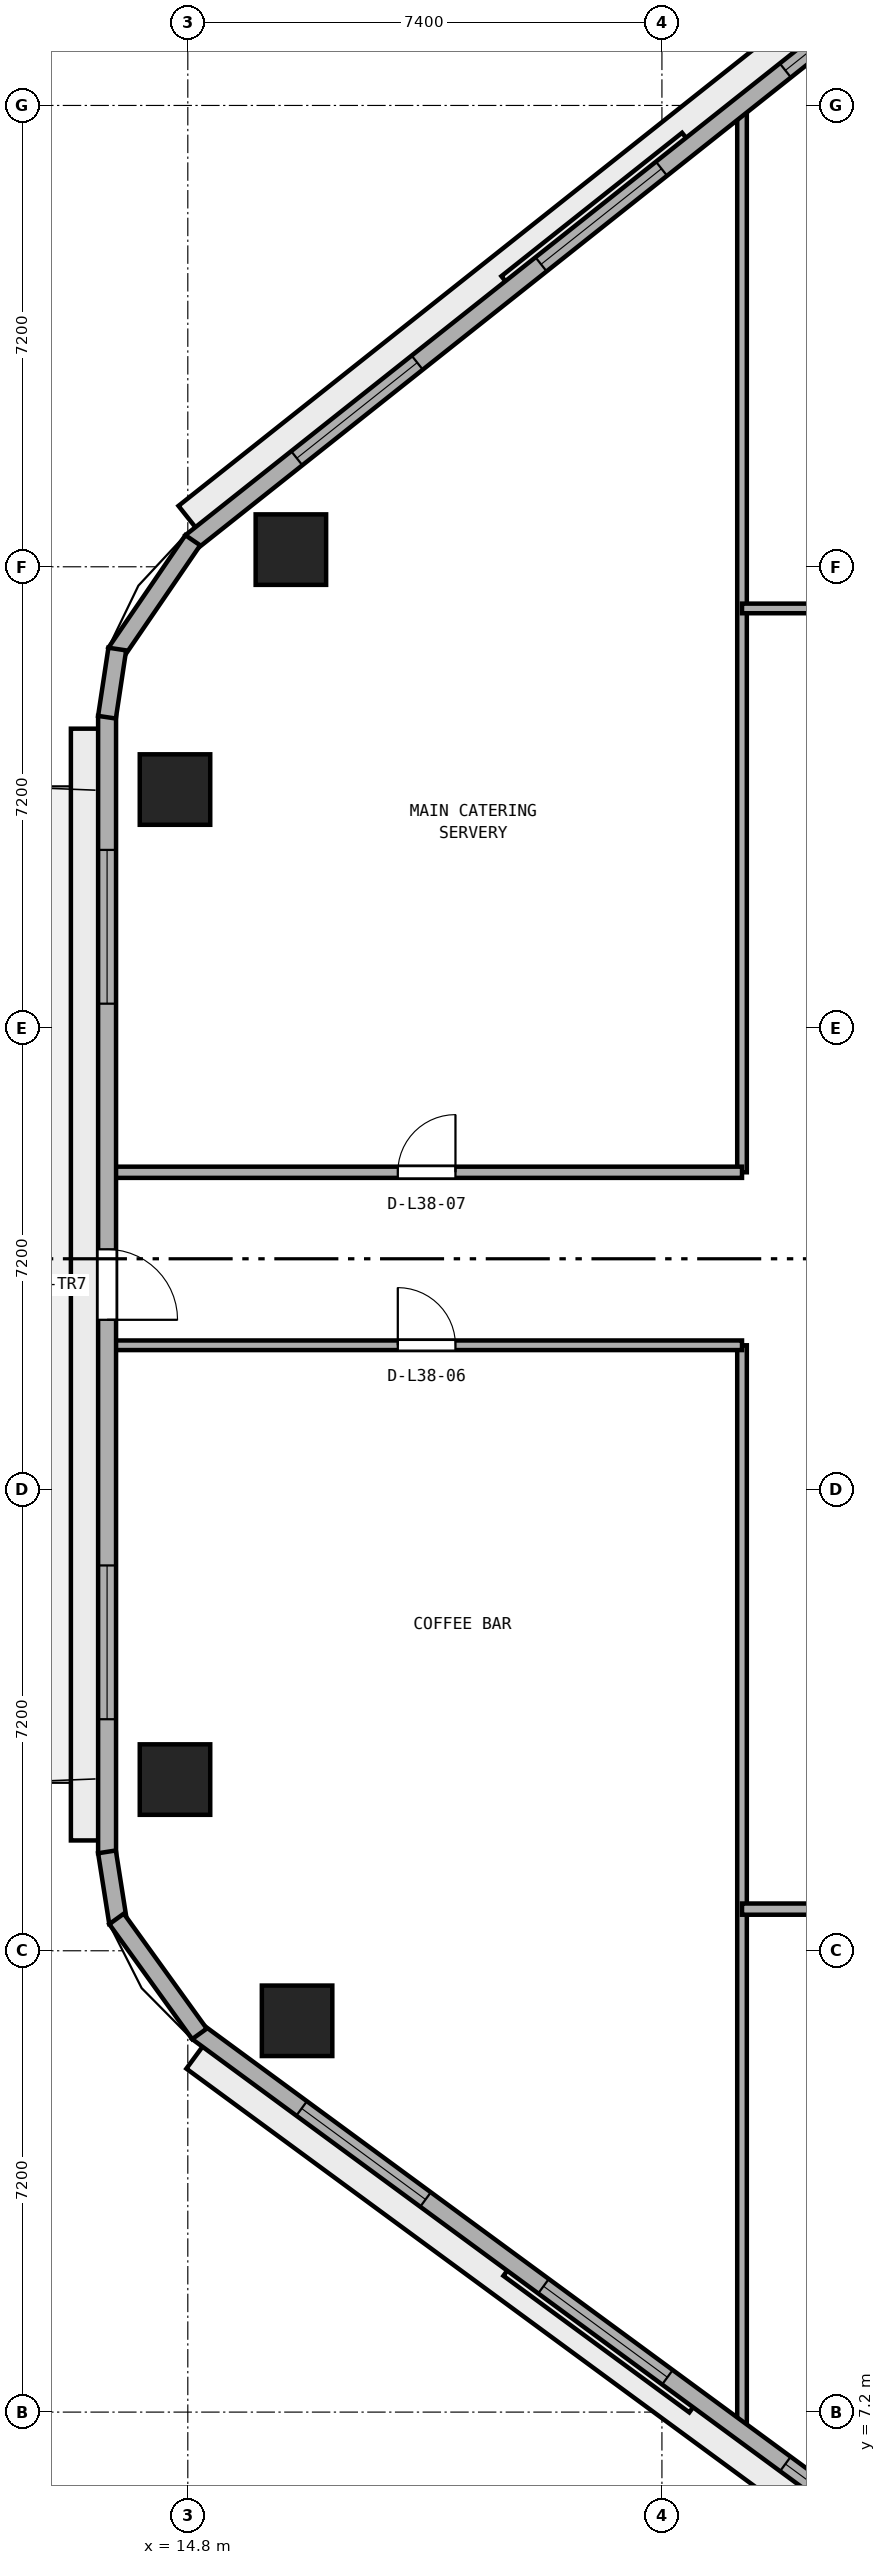
"""IFC4 building model, lengths in metres.
Left out: names, types, materials, properties, quantities, classifications, styles, units other than length and angle.
Written with IfcOpenShell. Run it as: python <this file> out.ifc"""

import sys

from ifc_helpers import new_model, si_unit, direction, frame, frame_2d, origin, origin_2d, place, context, subcontext, project, spatial, rectangle, extrude, element, fill, save


model = new_model("IFC4")
c1 = context("Model", 3, precision=1e-05, world=origin(), true_north=direction((0.0, 1.0)))
c2 = subcontext(c1, "Body", "Model", "MODEL_VIEW")
j1 = project(units=[si_unit("LENGTHUNIT", "METRE"), si_unit("PLANEANGLEUNIT", "RADIAN")], contexts=[c1])
p1 = place(None, origin())
s1 = spatial("IfcSite", under=j1, at=p1, CompositionType="ELEMENT")
p2 = place(p1, origin())
s2 = spatial("IfcBuilding", under=s1, at=p2, CompositionType="ELEMENT")
p3 = place(p2, frame((0.0, 0.0, 151.6)))
s3 = spatial("IfcBuildingStorey", under=s2, at=p3, CompositionType="ELEMENT", Elevation=151.6)
for number, where, z_axis, x_axis in (
    (1, (16.409, 36.268, 0.0), (0.0, 0.0, 1.0), (1.0, 0.0, 0.0)),
    (2, (14.6, 32.523, 0.0), (0.0, 0.0, 1.0), (1.0, 0.0, 0.0)),
    (3, (14.6, 17.072, 0.0), (0.0, 0.0, 1.0), (1.0, 0.0, 0.0)),
    (4, (16.505, 13.307, 0.0), (0.0, 0.0, 1.0), (1.0, 0.0, 0.0)),
):
    element("IfcColumn", number, at=place(p3, frame(where, z_axis=z_axis, x_axis=x_axis)), inside=s3, PredefinedType="COLUMN", context=c2, shape_type="SweptSolid", body=[
        extrude(rectangle(XDim=1.1, YDim=1.1, at=origin_2d()), origin(), (0.0, 0.0, 1.0), 3.8),
    ])
p4 = place(p3, frame((23.45, 6.854, 0.0), z_axis=(0.0, 0.0, 1.0), x_axis=(0.0, 1.0, 0.0)))
e5 = element("IfcWall", 5, at=p4, inside=s3, PredefinedType="PARTITIONING", context=c2, shape_type="SweptSolid", body=[
    extrude(rectangle(XDim=16.996, YDim=0.15, at=frame_2d((8.498, 0.0))), origin(), (0.0, 0.0, 1.0), 3.54),
])
p5 = place(p3, frame((23.45, 26.55, 0.0), z_axis=(0.0, 0.0, 1.0), x_axis=(0.0, 1.0, 0.0)))
e6 = element("IfcWall", 6, at=p5, inside=s3, PredefinedType="PARTITIONING", context=c2, shape_type="SweptSolid", body=[
    extrude(rectangle(XDim=16.698, YDim=0.15, at=frame_2d((8.349, 0.0))), origin(), (0.0, 0.0, 1.0), 3.54),
])
p6 = place(p3, frame((23.45, 15.05, 0.0), z_axis=(0.0, 0.0, 1.0), x_axis=(1.0, 0.0, 0.0)))
e7 = element("IfcWall", 7, at=p6, inside=s3, PredefinedType="PARTITIONING", context=c2, shape_type="SweptSolid", body=[
    extrude(rectangle(XDim=27.1, YDim=0.175, at=frame_2d((13.55, 0.0))), origin(), (0.0, 0.0, 1.0), 3.54),
])
p7 = place(p6, frame((3.895, 0.0, 0.0)))
e8 = element("IfcOpeningElement", 8, at=p7, cuts=e7, PredefinedType="OPENING", context=c2, shape_type="SweptSolid", body=[
    extrude(rectangle(XDim=0.9, YDim=2.1, at=frame_2d((0.45, 1.05))), frame((0.0, 0.097, 0.0), z_axis=(0.0, -1.0, 0.0), x_axis=(1.0, 0.0, 0.0)), (0.0, 0.0, 1.0), 0.195),
])
p8 = place(p6, frame((13.75, 0.0, 0.0)))
e9 = element("IfcOpeningElement", 9, at=p8, cuts=e7, PredefinedType="OPENING", context=c2, shape_type="SweptSolid", body=[
    extrude(rectangle(XDim=0.9, YDim=2.1, at=frame_2d((0.45, 1.05))), frame((0.0, 0.097, 0.0), z_axis=(0.0, -1.0, 0.0), x_axis=(1.0, 0.0, 0.0)), (0.0, 0.0, 1.0), 0.195),
])
p9 = place(p6, frame((22.955, 0.0, 0.0)))
e10 = element("IfcOpeningElement", 10, at=p9, cuts=e7, PredefinedType="OPENING", context=c2, shape_type="SweptSolid", body=[
    extrude(rectangle(XDim=0.9, YDim=2.1, at=frame_2d((0.45, 1.05))), frame((0.0, 0.097, 0.0), z_axis=(0.0, -1.0, 0.0), x_axis=(1.0, 0.0, 0.0)), (0.0, 0.0, 1.0), 0.195),
])
p10 = place(p3, frame((13.605, 23.85, 0.0), z_axis=(0.0, 0.0, 1.0), x_axis=(1.0, 0.0, 0.0)))
e11 = element("IfcWall", 11, at=p10, inside=s3, PredefinedType="PARTITIONING", context=c2, shape_type="SweptSolid", body=[
    extrude(rectangle(XDim=9.845, YDim=0.15, at=frame_2d((4.922, 0.0))), origin(), (0.0, 0.0, 1.0), 3.54),
])
p11 = place(p10, frame((4.472, 0.0, 0.0)))
e12 = element("IfcOpeningElement", 12, at=p11, cuts=e11, PredefinedType="OPENING", context=c2, shape_type="SweptSolid", body=[
    extrude(rectangle(XDim=0.9, YDim=2.1, at=frame_2d((0.45, 1.05))), frame((0.0, 0.085, 0.0), z_axis=(0.0, -1.0, 0.0), x_axis=(1.0, 0.0, 0.0)), (0.0, 0.0, 1.0), 0.17),
])
p12 = place(p3, frame((13.605, 26.55, 0.0), z_axis=(0.0, 0.0, 1.0), x_axis=(1.0, 0.0, 0.0)))
e13 = element("IfcWall", 13, at=p12, inside=s3, PredefinedType="PARTITIONING", context=c2, shape_type="SweptSolid", body=[
    extrude(rectangle(XDim=9.845, YDim=0.175, at=frame_2d((4.922, 0.0))), origin(), (0.0, 0.0, 1.0), 3.54),
])
p13 = place(p12, frame((4.472, 0.0, 0.0)))
e14 = element("IfcOpeningElement", 14, at=p13, cuts=e13, PredefinedType="OPENING", context=c2, shape_type="SweptSolid", body=[
    extrude(rectangle(XDim=0.9, YDim=2.1, at=frame_2d((0.45, 1.05))), frame((0.0, 0.097, 0.0), z_axis=(0.0, -1.0, 0.0), x_axis=(1.0, 0.0, 0.0)), (0.0, 0.0, 1.0), 0.195),
])
p14 = place(p3, frame((23.45, 35.35, 0.0), z_axis=(0.0, 0.0, 1.0), x_axis=(1.0, 0.0, 0.0)))
e15 = element("IfcWall", 15, at=p14, inside=s3, PredefinedType="PARTITIONING", context=c2, shape_type="SweptSolid", body=[
    extrude(rectangle(XDim=10.95, YDim=0.15, at=frame_2d((5.475, 0.0))), origin(), (0.0, 0.0, 1.0), 3.54),
])
p15 = place(p14, frame((3.295, 0.0, 0.0)))
e16 = element("IfcOpeningElement", 16, at=p15, cuts=e15, PredefinedType="OPENING", context=c2, shape_type="SweptSolid", body=[
    extrude(rectangle(XDim=1.0, YDim=2.12, at=frame_2d((0.5, 1.06))), frame((0.0, 0.085, 0.0), z_axis=(0.0, -1.0, 0.0), x_axis=(1.0, 0.0, 0.0)), (0.0, 0.0, 1.0), 0.17),
])
p16 = place(p14, frame((8.53, 0.0, 0.0)))
e17 = element("IfcOpeningElement", 17, at=p16, cuts=e15, PredefinedType="OPENING", context=c2, shape_type="SweptSolid", body=[
    extrude(rectangle(XDim=1.0, YDim=2.12, at=frame_2d((0.5, 1.06))), frame((0.0, 0.085, 0.0), z_axis=(0.0, -1.0, 0.0), x_axis=(1.0, 0.0, 0.0)), (0.0, 0.0, 1.0), 0.17),
])
p17 = place(p3, frame((27.658, 46.55, 0.0), z_axis=(0.0, 0.0, 1.0), x_axis=(-0.783266285861, -0.621686356158, 0.0)))
e18 = element("IfcWall", 18, at=p17, inside=s3, PredefinedType="STANDARD", context=c2, shape_type="SweptSolid", body=[
    extrude(rectangle(XDim=16.353, YDim=0.28, at=frame_2d((8.177, 0.0))), origin(), (0.0, 0.0, 1.0), 3.54),
])
p18 = place(p17, frame((2.109, 0.0, 0.9)))
e19 = element("IfcOpeningElement", 19, at=p18, cuts=e18, PredefinedType="OPENING", context=c2, shape_type="SweptSolid", body=[
    extrude(rectangle(XDim=2.4, YDim=1.75, at=frame_2d((1.2, 0.875))), frame((0.0, 0.15, 0.0), z_axis=(0.0, -1.0, 0.0), x_axis=(1.0, 0.0, 0.0)), (0.0, 0.0, 1.0), 0.3),
])
p19 = place(p17, frame((6.977, 0.0, 0.9)))
e20 = element("IfcOpeningElement", 20, at=p19, cuts=e18, PredefinedType="OPENING", context=c2, shape_type="SweptSolid", body=[
    extrude(rectangle(XDim=2.4, YDim=1.75, at=frame_2d((1.2, 0.875))), frame((0.0, 0.15, 0.0), z_axis=(0.0, -1.0, 0.0), x_axis=(1.0, 0.0, 0.0)), (0.0, 0.0, 1.0), 0.3),
])
p20 = place(p17, frame((11.844, 0.0, 0.9)))
e21 = element("IfcOpeningElement", 21, at=p20, cuts=e18, PredefinedType="OPENING", context=c2, shape_type="SweptSolid", body=[
    extrude(rectangle(XDim=2.4, YDim=1.75, at=frame_2d((1.2, 0.875))), frame((0.0, 0.15, 0.0), z_axis=(0.0, -1.0, 0.0), x_axis=(1.0, 0.0, 0.0)), (0.0, 0.0, 1.0), 0.3),
])
p21 = place(p3, frame((13.54, 33.673, 0.0), z_axis=(0.0, 0.0, 1.0), x_axis=(0.0, -1.0, 0.0)))
e22 = element("IfcWall", 22, at=p21, inside=s3, PredefinedType="STANDARD", context=c2, shape_type="SweptSolid", body=[
    extrude(rectangle(XDim=17.751, YDim=0.28, at=frame_2d((8.875, 0.0))), origin(), (0.0, 0.0, 1.0), 3.54),
])
p22 = place(p21, frame((8.326, 0.0, 0.0)))
e23 = element("IfcOpeningElement", 23, at=p22, cuts=e22, PredefinedType="OPENING", context=c2, shape_type="SweptSolid", body=[
    extrude(rectangle(XDim=1.1, YDim=2.2, at=frame_2d((0.55, 1.1))), frame((0.0, 0.15, 0.0), z_axis=(0.0, -1.0, 0.0), x_axis=(1.0, 0.0, 0.0)), (0.0, 0.0, 1.0), 0.3),
])
p23 = place(p21, frame((2.092, 0.0, 0.9)))
e24 = element("IfcOpeningElement", 24, at=p23, cuts=e22, PredefinedType="OPENING", context=c2, shape_type="SweptSolid", body=[
    extrude(rectangle(XDim=2.4, YDim=1.75, at=frame_2d((1.2, 0.875))), frame((0.0, 0.15, 0.0), z_axis=(0.0, -1.0, 0.0), x_axis=(1.0, 0.0, 0.0)), (0.0, 0.0, 1.0), 0.3),
])
p24 = place(p21, frame((13.26, 0.0, 0.9)))
e25 = element("IfcOpeningElement", 25, at=p24, cuts=e22, PredefinedType="OPENING", context=c2, shape_type="SweptSolid", body=[
    extrude(rectangle(XDim=2.4, YDim=1.75, at=frame_2d((1.2, 0.875))), frame((0.0, 0.15, 0.0), z_axis=(0.0, -1.0, 0.0), x_axis=(1.0, 0.0, 0.0)), (0.0, 0.0, 1.0), 0.3),
])
p25 = place(p3, frame((14.951, 13.134, 0.0), z_axis=(0.0, 0.0, 1.0), x_axis=(0.805804940328, -0.592181051827, 0.0)))
e26 = element("IfcWall", 26, at=p25, inside=s3, PredefinedType="STANDARD", context=c2, shape_type="SweptSolid", body=[
    extrude(rectangle(XDim=15.804, YDim=0.28, at=frame_2d((7.902, 0.0))), origin(), (0.0, 0.0, 1.0), 3.54),
])
p26 = place(p25, frame((2.017, 0.0, 0.9)))
e27 = element("IfcOpeningElement", 27, at=p26, cuts=e26, PredefinedType="OPENING", context=c2, shape_type="SweptSolid", body=[
    extrude(rectangle(XDim=2.4, YDim=1.75, at=frame_2d((1.2, 0.875))), frame((0.0, 0.15, 0.0), z_axis=(0.0, -1.0, 0.0), x_axis=(1.0, 0.0, 0.0)), (0.0, 0.0, 1.0), 0.3),
])
p27 = place(p25, frame((6.702, 0.0, 0.9)))
e28 = element("IfcOpeningElement", 28, at=p27, cuts=e26, PredefinedType="OPENING", context=c2, shape_type="SweptSolid", body=[
    extrude(rectangle(XDim=2.4, YDim=1.75, at=frame_2d((1.2, 0.875))), frame((0.0, 0.15, 0.0), z_axis=(0.0, -1.0, 0.0), x_axis=(1.0, 0.0, 0.0)), (0.0, 0.0, 1.0), 0.3),
])
p28 = place(p25, frame((11.387, 0.0, 0.9)))
e29 = element("IfcOpeningElement", 29, at=p28, cuts=e26, PredefinedType="OPENING", context=c2, shape_type="SweptSolid", body=[
    extrude(rectangle(XDim=2.4, YDim=1.75, at=frame_2d((1.2, 0.875))), frame((0.0, 0.15, 0.0), z_axis=(0.0, -1.0, 0.0), x_axis=(1.0, 0.0, 0.0)), (0.0, 0.0, 1.0), 0.3),
])
p29 = place(p3, frame((14.878, 36.414, 0.0), z_axis=(0.0, 0.0, 1.0), x_axis=(-0.564564614133, -0.825388875906, 0.0)))
e30 = element("IfcWall", 30, at=p29, inside=s3, PredefinedType="STANDARD", context=c2, shape_type="SweptSolid", body=[
    extrude(rectangle(XDim=2.128, YDim=0.28, at=frame_2d((1.064, 0.0))), origin(), (0.0, 0.0, 1.0), 3.54),
])
p30 = place(p3, frame((13.699, 34.716, 0.0), z_axis=(0.0, 0.0, 1.0), x_axis=(-0.149549920187, -0.988754176412, 0.0)))
e31 = element("IfcWall", 31, at=p30, inside=s3, PredefinedType="STANDARD", context=c2, shape_type="SweptSolid", body=[
    extrude(rectangle(XDim=1.076, YDim=0.28, at=frame_2d((0.538, 0.0))), origin(), (0.0, 0.0, 1.0), 3.54),
])
p31 = place(p3, frame((13.538, 15.944, 0.0), z_axis=(0.0, 0.0, 1.0), x_axis=(0.155447556013, -0.987844146275, 0.0)))
e32 = element("IfcWall", 32, at=p31, inside=s3, PredefinedType="STANDARD", context=c2, shape_type="SweptSolid", body=[
    extrude(rectangle(XDim=1.12, YDim=0.28, at=frame_2d((0.56, 0.0))), origin(), (0.0, 0.0, 1.0), 3.54),
])
p32 = place(p3, frame((13.688, 14.898, 0.0), z_axis=(0.0, 0.0, 1.0), x_axis=(0.584833657716, -0.811153248655, 0.0)))
e33 = element("IfcWall", 33, at=p32, inside=s3, PredefinedType="STANDARD", context=c2, shape_type="SweptSolid", body=[
    extrude(rectangle(XDim=2.212, YDim=0.28, at=frame_2d((1.106, 0.0))), origin(), (0.0, 0.0, 1.0), 3.54),
])
p33 = place(p11, origin())
e34 = element("IfcDoor", 34, at=p33, inside=s3, OperationType="SINGLE_SWING_LEFT", PredefinedType="DOOR", context=c2, shape_type="SweptSolid", body=[
    extrude(rectangle(XDim=0.9, YDim=2.1, at=frame_2d((0.45, 1.05))), frame((0.0, 0.025, 0.0), z_axis=(0.0, -1.0, 0.0), x_axis=(1.0, 0.0, 0.0)), (0.0, 0.0, 1.0), 0.05),
])
fill(e12, e34)
p34 = place(p13, origin())
e35 = element("IfcDoor", 35, at=p34, inside=s3, OperationType="SINGLE_SWING_RIGHT", PredefinedType="DOOR", context=c2, shape_type="SweptSolid", body=[
    extrude(rectangle(XDim=0.9, YDim=2.1, at=frame_2d((0.45, 1.05))), frame((0.0, 0.025, 0.0), z_axis=(0.0, -1.0, 0.0), x_axis=(1.0, 0.0, 0.0)), (0.0, 0.0, 1.0), 0.05),
])
fill(e14, e35)
p35 = place(p18, origin())
e36 = element("IfcWindow", 36, at=p35, inside=s3, PartitioningType="SINGLE_PANEL", PredefinedType="WINDOW", context=c2, shape_type="SweptSolid", body=[
    extrude(rectangle(XDim=2.4, YDim=1.75, at=frame_2d((1.2, 0.875))), frame((0.0, 0.03, 0.0), z_axis=(0.0, -1.0, 0.0), x_axis=(1.0, 0.0, 0.0)), (0.0, 0.0, 1.0), 0.06),
])
fill(e19, e36)
p36 = place(p19, origin())
e37 = element("IfcWindow", 37, at=p36, inside=s3, PartitioningType="SINGLE_PANEL", PredefinedType="WINDOW", context=c2, shape_type="SweptSolid", body=[
    extrude(rectangle(XDim=2.4, YDim=1.75, at=frame_2d((1.2, 0.875))), frame((0.0, 0.03, 0.0), z_axis=(0.0, -1.0, 0.0), x_axis=(1.0, 0.0, 0.0)), (0.0, 0.0, 1.0), 0.06),
])
fill(e20, e37)
p37 = place(p20, origin())
e38 = element("IfcWindow", 38, at=p37, inside=s3, PartitioningType="SINGLE_PANEL", PredefinedType="WINDOW", context=c2, shape_type="SweptSolid", body=[
    extrude(rectangle(XDim=2.4, YDim=1.75, at=frame_2d((1.2, 0.875))), frame((0.0, 0.03, 0.0), z_axis=(0.0, -1.0, 0.0), x_axis=(1.0, 0.0, 0.0)), (0.0, 0.0, 1.0), 0.06),
])
fill(e21, e38)
p38 = place(p22, origin())
e39 = element("IfcDoor", 39, at=p38, inside=s3, OperationType="SINGLE_SWING_RIGHT", PredefinedType="DOOR", context=c2, shape_type="SweptSolid", body=[
    extrude(rectangle(XDim=1.1, YDim=2.2, at=frame_2d((0.55, 1.1))), frame((0.0, 0.025, 0.0), z_axis=(0.0, -1.0, 0.0), x_axis=(1.0, 0.0, 0.0)), (0.0, 0.0, 1.0), 0.05),
])
fill(e23, e39)
p39 = place(p23, origin())
e40 = element("IfcWindow", 40, at=p39, inside=s3, PartitioningType="SINGLE_PANEL", PredefinedType="WINDOW", context=c2, shape_type="SweptSolid", body=[
    extrude(rectangle(XDim=2.4, YDim=1.75, at=frame_2d((1.2, 0.875))), frame((0.0, 0.03, 0.0), z_axis=(0.0, -1.0, 0.0), x_axis=(1.0, 0.0, 0.0)), (0.0, 0.0, 1.0), 0.06),
])
fill(e24, e40)
p40 = place(p24, origin())
e41 = element("IfcWindow", 41, at=p40, inside=s3, PartitioningType="SINGLE_PANEL", PredefinedType="WINDOW", context=c2, shape_type="SweptSolid", body=[
    extrude(rectangle(XDim=2.4, YDim=1.75, at=frame_2d((1.2, 0.875))), frame((0.0, 0.03, 0.0), z_axis=(0.0, -1.0, 0.0), x_axis=(1.0, 0.0, 0.0)), (0.0, 0.0, 1.0), 0.06),
])
fill(e25, e41)
p41 = place(p26, origin())
e42 = element("IfcWindow", 42, at=p41, inside=s3, PartitioningType="SINGLE_PANEL", PredefinedType="WINDOW", context=c2, shape_type="SweptSolid", body=[
    extrude(rectangle(XDim=2.4, YDim=1.75, at=frame_2d((1.2, 0.875))), frame((0.0, 0.03, 0.0), z_axis=(0.0, -1.0, 0.0), x_axis=(1.0, 0.0, 0.0)), (0.0, 0.0, 1.0), 0.06),
])
fill(e27, e42)
p42 = place(p27, origin())
e43 = element("IfcWindow", 43, at=p42, inside=s3, PartitioningType="SINGLE_PANEL", PredefinedType="WINDOW", context=c2, shape_type="SweptSolid", body=[
    extrude(rectangle(XDim=2.4, YDim=1.75, at=frame_2d((1.2, 0.875))), frame((0.0, 0.03, 0.0), z_axis=(0.0, -1.0, 0.0), x_axis=(1.0, 0.0, 0.0)), (0.0, 0.0, 1.0), 0.06),
])
fill(e28, e43)
p43 = place(p28, origin())
e44 = element("IfcWindow", 44, at=p43, inside=s3, PartitioningType="SINGLE_PANEL", PredefinedType="WINDOW", context=c2, shape_type="SweptSolid", body=[
    extrude(rectangle(XDim=2.4, YDim=1.75, at=frame_2d((1.2, 0.875))), frame((0.0, 0.03, 0.0), z_axis=(0.0, -1.0, 0.0), x_axis=(1.0, 0.0, 0.0)), (0.0, 0.0, 1.0), 0.06),
])
fill(e29, e44)
save(model, sys.argv[1])
